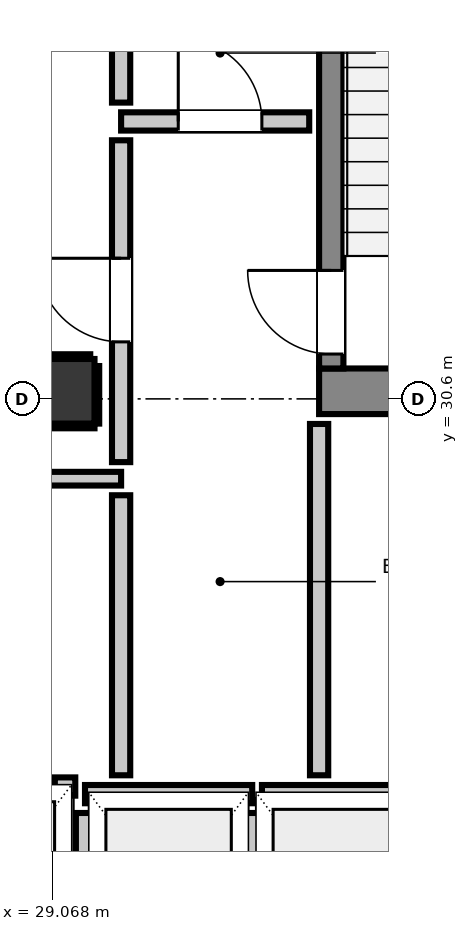
"""IFC4 building model, lengths in metres.
Left out: names, types, materials, properties, quantities, classifications, styles, units other than length and angle.
Written with IfcOpenShell. Run it as: python <this file> out.ifc"""

import sys

from ifc_helpers import new_model, si_unit, direction, frame, frame_2d, origin, origin_2d, place, context, subcontext, project, spatial, rectangle, extrude, element, fill, save


model = new_model("IFC4")
c1 = context("Model", 3, precision=1e-05, world=origin(), true_north=direction((0.0, 1.0)))
c2 = subcontext(c1, "Body", "Model", "MODEL_VIEW")
j1 = project(units=[si_unit("LENGTHUNIT", "METRE"), si_unit("PLANEANGLEUNIT", "RADIAN")], contexts=[c1])
p1 = place(None, origin())
s1 = spatial("IfcSite", under=j1, at=p1, CompositionType="ELEMENT")
p2 = place(p1, origin())
s2 = spatial("IfcBuilding", under=s1, at=p2, CompositionType="ELEMENT")
p3 = place(p2, frame((0.0, 0.0, 241.24)))
s3 = spatial("IfcBuildingStorey", under=s2, at=p3, CompositionType="ELEMENT", Elevation=241.24)
p4 = place(p3, frame((32.58, 30.7, 0.0), z_axis=(0.0, 0.0, 1.0), x_axis=(1.0, 0.0, 0.0)))
e1 = element("IfcWall", 1, at=p4, inside=s3, PredefinedType="SHEAR", context=c2, shape_type="SweptSolid", body=[
    extrude(rectangle(XDim=3.54, YDim=0.6, at=frame_2d((1.77, 0.0))), origin(), (0.0, 0.0, 1.0), 3.32),
])
p5 = place(p3, frame((32.74, 31.0, 0.0), z_axis=(0.0, 0.0, 1.0), x_axis=(0.0, 1.0, 0.0)))
e2 = element("IfcWall", 2, at=p5, inside=s3, PredefinedType="SHEAR", context=c2, shape_type="SweptSolid", body=[
    extrude(rectangle(XDim=7.8, YDim=0.32, at=frame_2d((3.9, 0.0))), origin(), (0.0, 0.0, 1.0), 3.32),
])
p6 = place(p5, frame((0.19, 0.0, 0.0)))
e3 = element("IfcOpeningElement", 3, at=p6, cuts=e2, PredefinedType="OPENING", context=c2, shape_type="SweptSolid", body=[
    extrude(rectangle(XDim=1.1, YDim=2.15, at=frame_2d((0.55, 1.075))), frame((0.0, 0.17, 0.0), z_axis=(0.0, -1.0, 0.0), x_axis=(1.0, 0.0, 0.0)), (0.0, 0.0, 1.0), 0.34),
])
p7 = place(p3, frame((29.2, 30.7, 0.0), z_axis=(0.0, 0.0, 1.0), x_axis=(1.0, 0.0, 0.0)))
e4 = element("IfcColumn", 4, at=p7, inside=s3, PredefinedType="COLUMN", context=c2, shape_type="SweptSolid", body=[
    extrude(rectangle(XDim=0.85, YDim=0.85, at=origin_2d()), origin(), (0.0, 0.0, 1.0), 3.32),
])
p8 = place(p3, frame((29.5, 25.4, 0.0), z_axis=(0.0, 0.0, 1.0), x_axis=(1.0, 0.0, 0.0)))
e5 = element("IfcWall", 5, at=p8, inside=s3, PredefinedType="PARTITIONING", context=c2, shape_type="SweptSolid", body=[
    extrude(rectangle(XDim=2.2, YDim=0.24, at=frame_2d((1.1, 0.0))), origin(), (0.0, 0.0, 1.0), 3.1),
])
p9 = place(p3, frame((29.5, 22.848, 0.0), z_axis=(0.0, 0.0, 1.0), x_axis=(0.0, 1.0, 0.0)))
e6 = element("IfcWall", 6, at=p9, inside=s3, PredefinedType="PARTITIONING", context=c2, shape_type="SweptSolid", body=[
    extrude(rectangle(XDim=2.304, YDim=0.24, at=frame_2d((1.152, 0.0))), origin(), (0.0, 0.0, 1.0), 2.335),
])
p10 = place(p3, frame((31.7, 22.848, 0.0), z_axis=(0.0, 0.0, 1.0), x_axis=(0.0, 1.0, 0.0)))
e7 = element("IfcWall", 7, at=p10, inside=s3, PredefinedType="PARTITIONING", context=c2, shape_type="SweptSolid", body=[
    extrude(rectangle(XDim=2.304, YDim=0.24, at=frame_2d((1.152, 0.0))), origin(), (0.0, 0.0, 1.0), 3.1),
])
p11 = place(p3, frame((31.828, 25.4, 0.0), z_axis=(0.0, 0.0, 1.0), x_axis=(1.0, 0.0, 0.0)))
e8 = element("IfcWall", 8, at=p11, inside=s3, PredefinedType="PARTITIONING", context=c2, shape_type="SweptSolid", body=[
    extrude(rectangle(XDim=2.072, YDim=0.24, at=frame_2d((1.036, 0.0))), origin(), (0.0, 0.0, 1.0), 3.1),
])
p12 = place(p3, frame((29.103, 25.5, 0.0), z_axis=(0.0, 0.0, 1.0), x_axis=(1.0, 0.0, 0.0)))
e9 = element("IfcWall", 9, at=p12, inside=s3, PredefinedType="PARTITIONING", context=c2, shape_type="SweptSolid", body=[
    extrude(rectangle(XDim=0.269, YDim=0.24, at=frame_2d((0.135, 0.0))), origin(), (0.0, 0.0, 1.0), 3.1),
])
p13 = place(p3, frame((29.975, 34.25, 0.0), z_axis=(0.0, 0.0, 1.0), x_axis=(1.0, 0.0, 0.0)))
e10 = element("IfcWall", 10, at=p13, inside=s3, PredefinedType="PARTITIONING", context=c2, shape_type="SweptSolid", body=[
    extrude(rectangle(XDim=2.475, YDim=0.24, at=frame_2d((1.237, 0.0))), origin(), (0.0, 0.0, 1.0), 3.1),
])
p14 = place(p13, frame((0.752, 0.0, 0.0)))
e11 = element("IfcOpeningElement", 11, at=p14, cuts=e10, PredefinedType="OPENING", context=c2, shape_type="SweptSolid", body=[
    extrude(rectangle(XDim=1.1, YDim=2.15, at=frame_2d((0.55, 1.075))), frame((0.0, 0.13, 0.0), z_axis=(0.0, -1.0, 0.0), x_axis=(1.0, 0.0, 0.0)), (0.0, 0.0, 1.0), 0.26),
])
p15 = place(p3, frame((28.593, 29.55, 0.0), z_axis=(0.0, 0.0, 1.0), x_axis=(1.0, 0.0, 0.0)))
e12 = element("IfcWall", 12, at=p15, inside=s3, PredefinedType="PARTITIONING", context=c2, shape_type="SweptSolid", body=[
    extrude(rectangle(XDim=1.382, YDim=0.18, at=frame_2d((0.691, 0.0))), origin(), (0.0, 0.0, 1.0), 3.1),
])
p16 = place(p3, frame((29.975, 25.648, 0.0), z_axis=(0.0, 0.0, 1.0), x_axis=(0.0, 1.0, 0.0)))
e13 = element("IfcWall", 13, at=p16, inside=s3, PredefinedType="PARTITIONING", context=c2, shape_type="SweptSolid", body=[
    extrude(rectangle(XDim=3.684, YDim=0.24, at=frame_2d((1.842, 0.0))), origin(), (0.0, 0.0, 1.0), 3.1),
])
p17 = place(p3, frame((29.975, 29.768, 0.0), z_axis=(0.0, 0.0, 1.0), x_axis=(0.0, 1.0, 0.0)))
e14 = element("IfcWall", 14, at=p17, inside=s3, PredefinedType="PARTITIONING", context=c2, shape_type="SweptSolid", body=[
    extrude(rectangle(XDim=4.234, YDim=0.24, at=frame_2d((2.117, 0.0))), origin(), (0.0, 0.0, 1.0), 3.1),
])
p18 = place(p17, frame((1.582, 0.0, 0.0)))
e15 = element("IfcOpeningElement", 15, at=p18, cuts=e14, PredefinedType="OPENING", context=c2, shape_type="SweptSolid", body=[
    extrude(rectangle(XDim=1.1, YDim=2.15, at=frame_2d((0.55, 1.075))), frame((0.0, 0.13, 0.0), z_axis=(0.0, -1.0, 0.0), x_axis=(1.0, 0.0, 0.0)), (0.0, 0.0, 1.0), 0.26),
])
p19 = place(p3, frame((29.975, 34.498, 0.0), z_axis=(0.0, 0.0, 1.0), x_axis=(0.0, 1.0, 0.0)))
e16 = element("IfcWall", 16, at=p19, inside=s3, PredefinedType="PARTITIONING", context=c2, shape_type="SweptSolid", body=[
    extrude(rectangle(XDim=0.934, YDim=0.24, at=frame_2d((0.467, 0.0))), origin(), (0.0, 0.0, 1.0), 3.1),
])
p20 = place(p3, frame((32.58, 25.648, 0.0), z_axis=(0.0, 0.0, 1.0), x_axis=(0.0, 1.0, 0.0)))
e17 = element("IfcWall", 17, at=p20, inside=s3, PredefinedType="PARTITIONING", context=c2, shape_type="SweptSolid", body=[
    extrude(rectangle(XDim=4.622, YDim=0.24, at=frame_2d((2.311, 0.0))), origin(), (0.0, 0.0, 1.0), 3.1),
])
p21 = place(p3, frame((28.775, 30.243, 0.0), z_axis=(0.0, 0.0, 1.0), x_axis=(1.0, 0.0, 0.0)))
e18 = element("IfcWall", 18, at=p21, inside=s3, PredefinedType="PARTITIONING", context=c2, shape_type="SweptSolid", body=[
    extrude(rectangle(XDim=0.85, YDim=0.06, at=frame_2d((0.425, 0.0))), origin(), (0.0, 0.0, 1.0), 1.45),
])
p22 = place(p3, frame((28.775, 31.157, 0.0), z_axis=(0.0, 0.0, 1.0), x_axis=(1.0, 0.0, 0.0)))
e19 = element("IfcWall", 19, at=p22, inside=s3, PredefinedType="PARTITIONING", context=c2, shape_type="SweptSolid", body=[
    extrude(rectangle(XDim=0.794, YDim=0.06, at=frame_2d((0.397, 0.0))), origin(), (0.0, 0.0, 1.0), 1.45),
])
p23 = place(p3, frame((29.657, 30.275, 0.0), z_axis=(0.0, 0.0, 1.0), x_axis=(0.0, 1.0, 0.0)))
e20 = element("IfcWall", 20, at=p23, inside=s3, PredefinedType="PARTITIONING", context=c2, shape_type="SweptSolid", body=[
    extrude(rectangle(XDim=0.757, YDim=0.06, at=frame_2d((0.378, 0.0))), origin(), (0.0, 0.0, 1.0), 1.45),
])
p24 = place(p6, origin())
e21 = element("IfcDoor", 21, at=p24, inside=s3, OperationType="SINGLE_SWING_RIGHT", PredefinedType="DOOR", context=c2, shape_type="SweptSolid", body=[
    extrude(rectangle(XDim=1.1, YDim=2.15, at=frame_2d((0.55, 1.075))), frame((0.0, 0.025, 0.0), z_axis=(0.0, -1.0, 0.0), x_axis=(1.0, 0.0, 0.0)), (0.0, 0.0, 1.0), 0.05),
])
fill(e3, e21)
p25 = place(p18, origin())
e22 = element("IfcDoor", 22, at=p25, inside=s3, OperationType="SINGLE_SWING_RIGHT", PredefinedType="DOOR", context=c2, shape_type="SweptSolid", body=[
    extrude(rectangle(XDim=1.1, YDim=2.15, at=frame_2d((0.55, 1.075))), frame((0.0, 0.025, 0.0), z_axis=(0.0, -1.0, 0.0), x_axis=(1.0, 0.0, 0.0)), (0.0, 0.0, 1.0), 0.05),
])
fill(e15, e22)
p26 = place(p14, origin())
e23 = element("IfcDoor", 23, at=p26, inside=s3, OperationType="SINGLE_SWING_LEFT", PredefinedType="DOOR", context=c2, shape_type="SweptSolid", body=[
    extrude(rectangle(XDim=1.1, YDim=2.15, at=frame_2d((0.55, 1.075))), frame((0.0, 0.025, 0.0), z_axis=(0.0, -1.0, 0.0), x_axis=(1.0, 0.0, 0.0)), (0.0, 0.0, 1.0), 0.05),
])
fill(e11, e23)
save(model, sys.argv[1])
